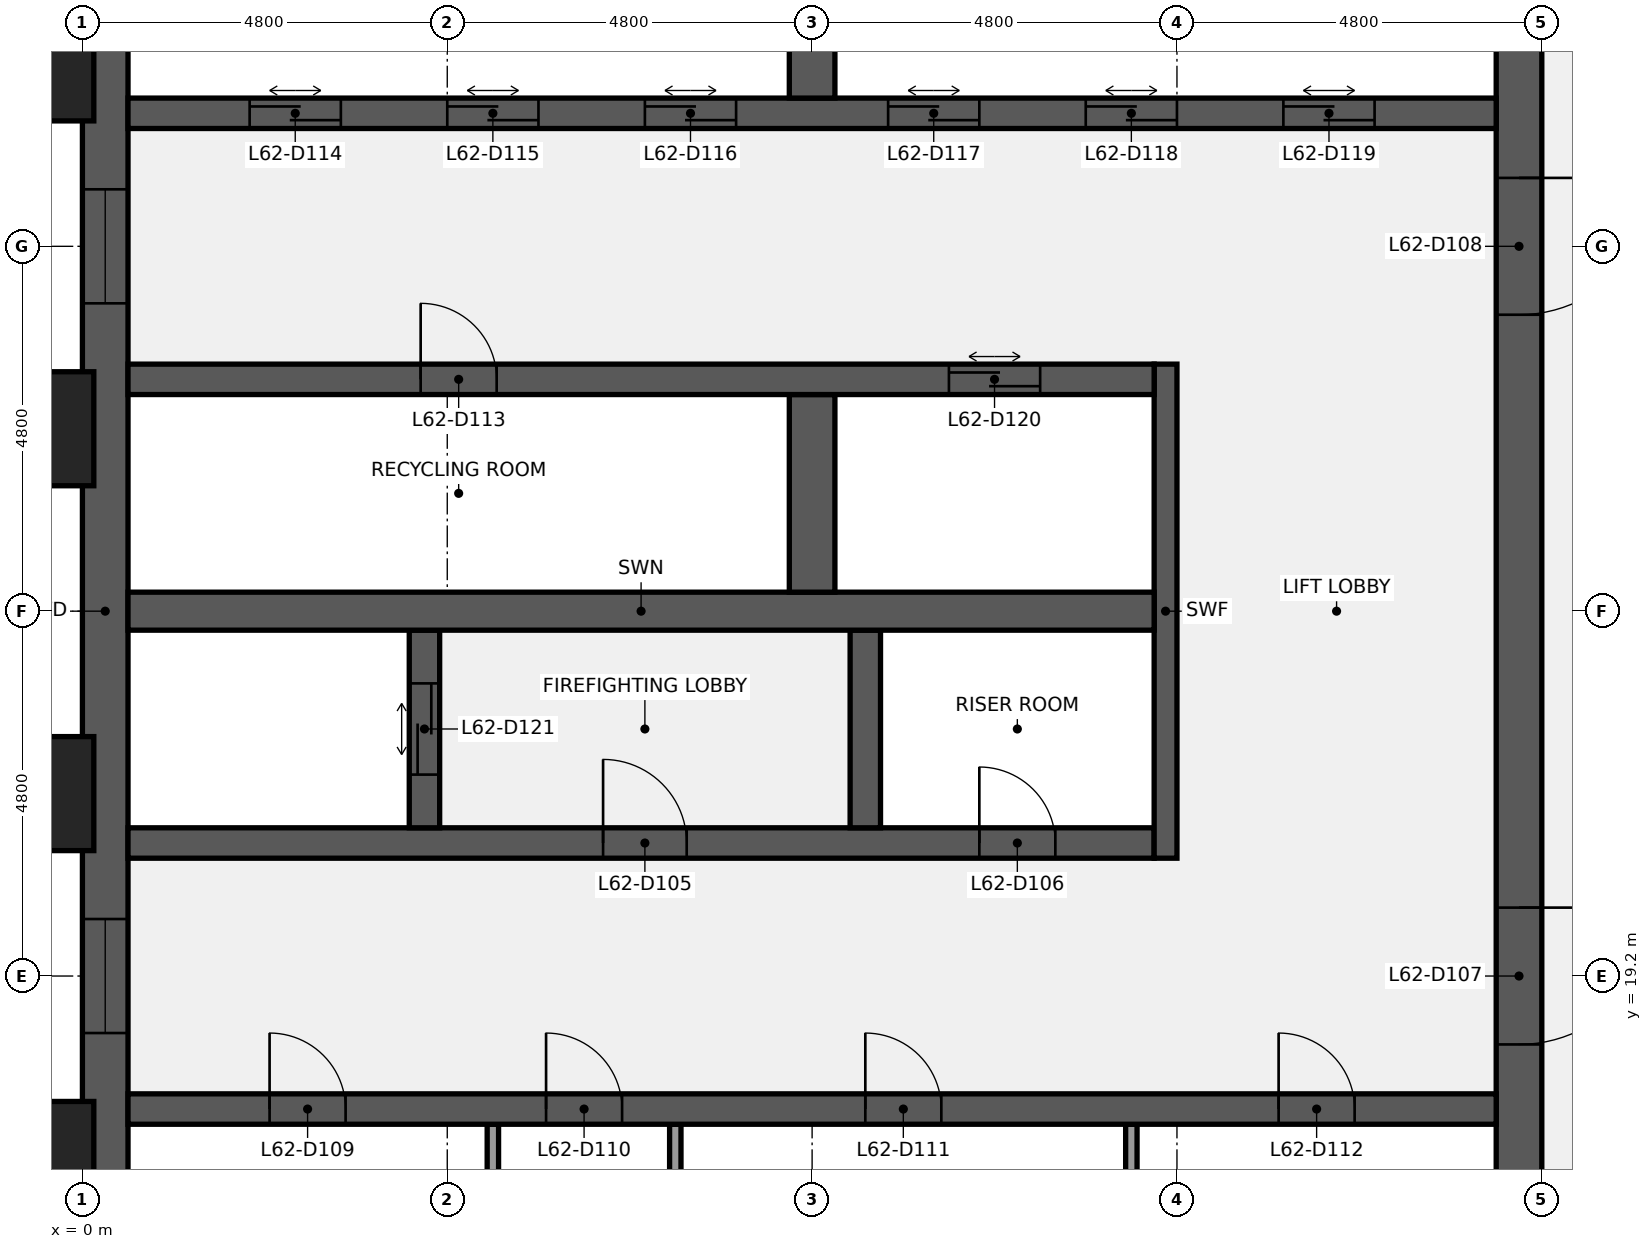
"""IFC4 building model, lengths in metres.
Left out: names, types, materials, properties, quantities, classifications, styles, units other than length and angle.
Written with IfcOpenShell. Run it as: python <this file> out.ifc"""

import sys

from ifc_helpers import new_model, si_unit, direction, frame, frame_2d, origin, origin_2d, place, context, subcontext, project, spatial, rectangle, extrude, element, fill, save


model = new_model("IFC4")
c1 = context("Model", 3, precision=1e-05, world=origin(), true_north=direction((0.0, 1.0)))
c2 = subcontext(c1, "Body", "Model", "MODEL_VIEW")
j1 = project(units=[si_unit("LENGTHUNIT", "METRE"), si_unit("PLANEANGLEUNIT", "RADIAN")], contexts=[c1])
p1 = place(None, origin())
s1 = spatial("IfcSite", under=j1, at=p1, CompositionType="ELEMENT")
p2 = place(p1, origin())
s2 = spatial("IfcBuilding", under=s1, at=p2, CompositionType="ELEMENT")
p3 = place(p2, frame((0.0, 0.0, 286.3)))
s3 = spatial("IfcBuildingStorey", under=s2, at=p3, CompositionType="ELEMENT", Elevation=286.3)
p4 = place(p3, frame((0.3, 9.6, 0.0), z_axis=(0.0, 0.0, 1.0), x_axis=(0.0, 1.0, 0.0)))
e1 = element("IfcWall", 1, at=p4, inside=s3, PredefinedType="SHEAR", context=c2, shape_type="SweptSolid", body=[
    extrude(rectangle(XDim=28.8, YDim=0.6, at=frame_2d((14.4, 0.0))), origin(), (0.0, 0.0, 1.0), 3.84),
])
p5 = place(p4, frame((8.85, 0.0, 0.9)))
e2 = element("IfcOpeningElement", 2, at=p5, cuts=e1, PredefinedType="OPENING", context=c2, shape_type="SweptSolid", body=[
    extrude(rectangle(XDim=1.5, YDim=1.5, at=frame_2d((0.75, 0.75))), frame((0.0, 0.31, 0.0), z_axis=(0.0, -1.0, 0.0), x_axis=(1.0, 0.0, 0.0)), (0.0, 0.0, 1.0), 0.62),
])
p6 = place(p4, frame((18.45, 0.0, 0.9)))
e3 = element("IfcOpeningElement", 3, at=p6, cuts=e1, PredefinedType="OPENING", context=c2, shape_type="SweptSolid", body=[
    extrude(rectangle(XDim=1.5, YDim=1.5, at=frame_2d((0.75, 0.75))), frame((0.0, 0.31, 0.0), z_axis=(0.0, -1.0, 0.0), x_axis=(1.0, 0.0, 0.0)), (0.0, 0.0, 1.0), 0.62),
])
p7 = place(p3, frame((18.9, 38.4, 0.0), z_axis=(0.0, 0.0, 1.0), x_axis=(0.0, -1.0, 0.0)))
e4 = element("IfcWall", 4, at=p7, inside=s3, PredefinedType="SHEAR", context=c2, shape_type="SweptSolid", body=[
    extrude(rectangle(XDim=28.8, YDim=0.6, at=frame_2d((14.4, 0.0))), origin(), (0.0, 0.0, 1.0), 3.84),
])
p8 = place(p7, frame((18.3, 0.0, 0.0)))
e5 = element("IfcOpeningElement", 5, at=p8, cuts=e4, PredefinedType="OPENING", context=c2, shape_type="SweptSolid", body=[
    extrude(rectangle(XDim=1.8, YDim=2.1, at=frame_2d((0.9, 1.05))), frame((0.0, 0.31, 0.0), z_axis=(0.0, -1.0, 0.0), x_axis=(1.0, 0.0, 0.0)), (0.0, 0.0, 1.0), 0.62),
])
p9 = place(p7, frame((8.7, 0.0, 0.0)))
e6 = element("IfcOpeningElement", 6, at=p9, cuts=e4, PredefinedType="OPENING", context=c2, shape_type="SweptSolid", body=[
    extrude(rectangle(XDim=1.8, YDim=2.1, at=frame_2d((0.9, 1.05))), frame((0.0, 0.31, 0.0), z_axis=(0.0, -1.0, 0.0), x_axis=(1.0, 0.0, 0.0)), (0.0, 0.0, 1.0), 0.62),
])
for number, where, z_axis, x_axis in (
    (7, (5.4, 14.65, 0.0), (0.0, 0.0, 1.0), (0.0, 1.0, 0.0)),
    (8, (7.8, 14.65, 0.0), (0.0, 0.0, 1.0), (0.0, 1.0, 0.0)),
    (9, (13.8, 14.65, 0.0), (0.0, 0.0, 1.0), (0.0, 1.0, 0.0)),
):
    element("IfcWall", number, at=place(p3, frame(where, z_axis=z_axis, x_axis=x_axis)), inside=s3, PredefinedType="PARTITIONING", context=c2, shape_type="SweptSolid", body=[
        extrude(rectangle(XDim=2.6, YDim=0.15, at=frame_2d((1.3, 0.0))), origin(), (0.0, 0.0, 1.0), 3.84),
    ])
p10 = place(p3, frame((0.6, 17.45, 0.0), z_axis=(0.0, 0.0, 1.0), x_axis=(1.0, 0.0, 0.0)))
e10 = element("IfcWall", 10, at=p10, inside=s3, PredefinedType="SHEAR", context=c2, shape_type="SweptSolid", body=[
    extrude(rectangle(XDim=18.0, YDim=0.4, at=frame_2d((9.0, 0.0))), origin(), (0.0, 0.0, 1.0), 3.84),
])
p11 = place(p10, frame((1.863, 0.0, 0.0)))
e11 = element("IfcOpeningElement", 11, at=p11, cuts=e10, PredefinedType="OPENING", context=c2, shape_type="SweptSolid", body=[
    extrude(rectangle(XDim=1.0, YDim=2.1, at=frame_2d((0.5, 1.05))), frame((0.0, 0.21, 0.0), z_axis=(0.0, -1.0, 0.0), x_axis=(1.0, 0.0, 0.0)), (0.0, 0.0, 1.0), 0.42),
])
p12 = place(p10, frame((5.5, 0.0, 0.0)))
e12 = element("IfcOpeningElement", 12, at=p12, cuts=e10, PredefinedType="OPENING", context=c2, shape_type="SweptSolid", body=[
    extrude(rectangle(XDim=1.0, YDim=2.1, at=frame_2d((0.5, 1.05))), frame((0.0, 0.21, 0.0), z_axis=(0.0, -1.0, 0.0), x_axis=(1.0, 0.0, 0.0)), (0.0, 0.0, 1.0), 0.42),
])
p13 = place(p10, frame((9.7, 0.0, 0.0)))
e13 = element("IfcOpeningElement", 13, at=p13, cuts=e10, PredefinedType="OPENING", context=c2, shape_type="SweptSolid", body=[
    extrude(rectangle(XDim=1.0, YDim=2.1, at=frame_2d((0.5, 1.05))), frame((0.0, 0.21, 0.0), z_axis=(0.0, -1.0, 0.0), x_axis=(1.0, 0.0, 0.0)), (0.0, 0.0, 1.0), 0.42),
])
p14 = place(p10, frame((15.137, 0.0, 0.0)))
e14 = element("IfcOpeningElement", 14, at=p14, cuts=e10, PredefinedType="OPENING", context=c2, shape_type="SweptSolid", body=[
    extrude(rectangle(XDim=1.0, YDim=2.1, at=frame_2d((0.5, 1.05))), frame((0.0, 0.21, 0.0), z_axis=(0.0, -1.0, 0.0), x_axis=(1.0, 0.0, 0.0)), (0.0, 0.0, 1.0), 0.42),
])
p15 = place(p3, frame((0.6, 20.95, 0.0), z_axis=(0.0, 0.0, 1.0), x_axis=(1.0, 0.0, 0.0)))
e15 = element("IfcWall", 15, at=p15, inside=s3, PredefinedType="SHEAR", context=c2, shape_type="SweptSolid", body=[
    extrude(rectangle(XDim=13.5, YDim=0.4, at=frame_2d((6.75, 0.0))), origin(), (0.0, 0.0, 1.0), 3.84),
])
p16 = place(p15, frame((6.25, 0.0, 0.0)))
e16 = element("IfcOpeningElement", 16, at=p16, cuts=e15, PredefinedType="OPENING", context=c2, shape_type="SweptSolid", body=[
    extrude(rectangle(XDim=1.1, YDim=2.1, at=frame_2d((0.55, 1.05))), frame((0.0, 0.21, 0.0), z_axis=(0.0, -1.0, 0.0), x_axis=(1.0, 0.0, 0.0)), (0.0, 0.0, 1.0), 0.42),
])
p17 = place(p15, frame((11.2, 0.0, 0.0)))
e17 = element("IfcOpeningElement", 17, at=p17, cuts=e15, PredefinedType="OPENING", context=c2, shape_type="SweptSolid", body=[
    extrude(rectangle(XDim=1.0, YDim=2.1, at=frame_2d((0.5, 1.05))), frame((0.0, 0.21, 0.0), z_axis=(0.0, -1.0, 0.0), x_axis=(1.0, 0.0, 0.0)), (0.0, 0.0, 1.0), 0.42),
])
p18 = place(p3, frame((14.25, 20.75, 0.0), z_axis=(0.0, 0.0, 1.0), x_axis=(0.0, 1.0, 0.0)))
e18 = element("IfcWall", 18, at=p18, inside=s3, PredefinedType="SHEAR", context=c2, shape_type="SweptSolid", body=[
    extrude(rectangle(XDim=6.5, YDim=0.3, at=frame_2d((3.25, 0.0))), origin(), (0.0, 0.0, 1.0), 3.84),
])
p19 = place(p3, frame((4.5, 21.15, 0.0), z_axis=(0.0, 0.0, 1.0), x_axis=(0.0, 1.0, 0.0)))
e19 = element("IfcWall", 19, at=p19, inside=s3, PredefinedType="SHEAR", context=c2, shape_type="SweptSolid", body=[
    extrude(rectangle(XDim=2.6, YDim=0.4, at=frame_2d((1.3, 0.0))), origin(), (0.0, 0.0, 1.0), 3.84),
])
p20 = place(p19, frame((0.7, 0.0, 0.0)))
e20 = element("IfcOpeningElement", 20, at=p20, cuts=e19, PredefinedType="OPENING", context=c2, shape_type="SweptSolid", body=[
    extrude(rectangle(XDim=1.2, YDim=2.1, at=frame_2d((0.6, 1.05))), frame((0.0, 0.21, 0.0), z_axis=(0.0, -1.0, 0.0), x_axis=(1.0, 0.0, 0.0)), (0.0, 0.0, 1.0), 0.42),
])
p21 = place(p3, frame((10.3, 21.15, 0.0), z_axis=(0.0, 0.0, 1.0), x_axis=(0.0, 1.0, 0.0)))
e21 = element("IfcWall", 21, at=p21, inside=s3, PredefinedType="SHEAR", context=c2, shape_type="SweptSolid", body=[
    extrude(rectangle(XDim=2.6, YDim=0.4, at=frame_2d((1.3, 0.0))), origin(), (0.0, 0.0, 1.0), 3.84),
])
p22 = place(p3, frame((0.6, 24.0, 0.0), z_axis=(0.0, 0.0, 1.0), x_axis=(1.0, 0.0, 0.0)))
e22 = element("IfcWall", 22, at=p22, inside=s3, PredefinedType="SHEAR", context=c2, shape_type="SweptSolid", body=[
    extrude(rectangle(XDim=13.5, YDim=0.5, at=frame_2d((6.75, 0.0))), origin(), (0.0, 0.0, 1.0), 3.84),
])
p23 = place(p3, frame((9.6, 24.25, 0.0), z_axis=(0.0, 0.0, 1.0), x_axis=(0.0, 1.0, 0.0)))
e23 = element("IfcWall", 23, at=p23, inside=s3, PredefinedType="SHEAR", context=c2, shape_type="SweptSolid", body=[
    extrude(rectangle(XDim=2.6, YDim=0.6, at=frame_2d((1.3, 0.0))), origin(), (0.0, 0.0, 1.0), 3.84),
])
p24 = place(p3, frame((0.6, 27.05, 0.0), z_axis=(0.0, 0.0, 1.0), x_axis=(1.0, 0.0, 0.0)))
e24 = element("IfcWall", 24, at=p24, inside=s3, PredefinedType="SHEAR", context=c2, shape_type="SweptSolid", body=[
    extrude(rectangle(XDim=13.5, YDim=0.4, at=frame_2d((6.75, 0.0))), origin(), (0.0, 0.0, 1.0), 3.84),
])
p25 = place(p24, frame((3.85, 0.0, 0.0)))
e25 = element("IfcOpeningElement", 25, at=p25, cuts=e24, PredefinedType="OPENING", context=c2, shape_type="SweptSolid", body=[
    extrude(rectangle(XDim=1.0, YDim=2.1, at=frame_2d((0.5, 1.05))), frame((0.0, 0.21, 0.0), z_axis=(0.0, -1.0, 0.0), x_axis=(1.0, 0.0, 0.0)), (0.0, 0.0, 1.0), 0.42),
])
p26 = place(p24, frame((10.8, 0.0, 0.0)))
e26 = element("IfcOpeningElement", 26, at=p26, cuts=e24, PredefinedType="OPENING", context=c2, shape_type="SweptSolid", body=[
    extrude(rectangle(XDim=1.2, YDim=2.1, at=frame_2d((0.6, 1.05))), frame((0.0, 0.21, 0.0), z_axis=(0.0, -1.0, 0.0), x_axis=(1.0, 0.0, 0.0)), (0.0, 0.0, 1.0), 0.42),
])
p27 = place(p3, frame((0.6, 30.55, 0.0), z_axis=(0.0, 0.0, 1.0), x_axis=(1.0, 0.0, 0.0)))
e27 = element("IfcWall", 27, at=p27, inside=s3, PredefinedType="SHEAR", context=c2, shape_type="SweptSolid", body=[
    extrude(rectangle(XDim=18.0, YDim=0.4, at=frame_2d((9.0, 0.0))), origin(), (0.0, 0.0, 1.0), 3.84),
])
p28 = place(p27, frame((1.6, 0.0, 0.0)))
e28 = element("IfcOpeningElement", 28, at=p28, cuts=e27, PredefinedType="OPENING", context=c2, shape_type="SweptSolid", body=[
    extrude(rectangle(XDim=1.2, YDim=2.1, at=frame_2d((0.6, 1.05))), frame((0.0, 0.21, 0.0), z_axis=(0.0, -1.0, 0.0), x_axis=(1.0, 0.0, 0.0)), (0.0, 0.0, 1.0), 0.42),
])
p29 = place(p27, frame((4.2, 0.0, 0.0)))
e29 = element("IfcOpeningElement", 29, at=p29, cuts=e27, PredefinedType="OPENING", context=c2, shape_type="SweptSolid", body=[
    extrude(rectangle(XDim=1.2, YDim=2.1, at=frame_2d((0.6, 1.05))), frame((0.0, 0.21, 0.0), z_axis=(0.0, -1.0, 0.0), x_axis=(1.0, 0.0, 0.0)), (0.0, 0.0, 1.0), 0.42),
])
p30 = place(p27, frame((6.8, 0.0, 0.0)))
e30 = element("IfcOpeningElement", 30, at=p30, cuts=e27, PredefinedType="OPENING", context=c2, shape_type="SweptSolid", body=[
    extrude(rectangle(XDim=1.2, YDim=2.1, at=frame_2d((0.6, 1.05))), frame((0.0, 0.21, 0.0), z_axis=(0.0, -1.0, 0.0), x_axis=(1.0, 0.0, 0.0)), (0.0, 0.0, 1.0), 0.42),
])
p31 = place(p27, frame((10.0, 0.0, 0.0)))
e31 = element("IfcOpeningElement", 31, at=p31, cuts=e27, PredefinedType="OPENING", context=c2, shape_type="SweptSolid", body=[
    extrude(rectangle(XDim=1.2, YDim=2.1, at=frame_2d((0.6, 1.05))), frame((0.0, 0.21, 0.0), z_axis=(0.0, -1.0, 0.0), x_axis=(1.0, 0.0, 0.0)), (0.0, 0.0, 1.0), 0.42),
])
p32 = place(p27, frame((12.6, 0.0, 0.0)))
e32 = element("IfcOpeningElement", 32, at=p32, cuts=e27, PredefinedType="OPENING", context=c2, shape_type="SweptSolid", body=[
    extrude(rectangle(XDim=1.2, YDim=2.1, at=frame_2d((0.6, 1.05))), frame((0.0, 0.21, 0.0), z_axis=(0.0, -1.0, 0.0), x_axis=(1.0, 0.0, 0.0)), (0.0, 0.0, 1.0), 0.42),
])
p33 = place(p27, frame((15.2, 0.0, 0.0)))
e33 = element("IfcOpeningElement", 33, at=p33, cuts=e27, PredefinedType="OPENING", context=c2, shape_type="SweptSolid", body=[
    extrude(rectangle(XDim=1.2, YDim=2.1, at=frame_2d((0.6, 1.05))), frame((0.0, 0.21, 0.0), z_axis=(0.0, -1.0, 0.0), x_axis=(1.0, 0.0, 0.0)), (0.0, 0.0, 1.0), 0.42),
])
p34 = place(p3, frame((9.6, 30.75, 0.0), z_axis=(0.0, 0.0, 1.0), x_axis=(0.0, 1.0, 0.0)))
e34 = element("IfcWall", 34, at=p34, inside=s3, PredefinedType="SHEAR", context=c2, shape_type="SweptSolid", body=[
    extrude(rectangle(XDim=2.6, YDim=0.6, at=frame_2d((1.3, 0.0))), origin(), (0.0, 0.0, 1.0), 3.84),
])
for number, where, z_axis, x_axis in (
    (35, (-0.75, 16.8, 0.0), (0.0, 0.0, 1.0), (0.0, 1.0, 0.0)),
    (36, (-0.75, 21.6, 0.0), (0.0, 0.0, 1.0), (0.0, 1.0, 0.0)),
    (37, (-0.75, 26.4, 0.0), (0.0, 0.0, 1.0), (0.0, 1.0, 0.0)),
    (38, (-0.75, 31.2, 0.0), (0.0, 0.0, 1.0), (0.0, 1.0, 0.0)),
):
    element("IfcColumn", number, at=place(p3, frame(where, z_axis=z_axis, x_axis=x_axis)), inside=s3, PredefinedType="PILASTER", context=c2, shape_type="SweptSolid", body=[
        extrude(rectangle(XDim=1.8, YDim=1.5, at=origin_2d()), origin(), (0.0, 0.0, 1.0), 4.0),
    ])
p35 = place(p16, origin())
e39 = element("IfcDoor", 39, at=p35, inside=s3, OperationType="SINGLE_SWING_LEFT", PredefinedType="DOOR", context=c2, shape_type="SweptSolid", body=[
    extrude(rectangle(XDim=1.1, YDim=2.1, at=frame_2d((0.55, 1.05))), frame((0.0, 0.025, 0.0), z_axis=(0.0, -1.0, 0.0), x_axis=(1.0, 0.0, 0.0)), (0.0, 0.0, 1.0), 0.05),
])
fill(e16, e39)
p36 = place(p17, origin())
e40 = element("IfcDoor", 40, at=p36, inside=s3, OperationType="SINGLE_SWING_LEFT", PredefinedType="DOOR", context=c2, shape_type="SweptSolid", body=[
    extrude(rectangle(XDim=1.0, YDim=2.1, at=frame_2d((0.5, 1.05))), frame((0.0, 0.025, 0.0), z_axis=(0.0, -1.0, 0.0), x_axis=(1.0, 0.0, 0.0)), (0.0, 0.0, 1.0), 0.05),
])
fill(e17, e40)
p37 = place(p8, origin())
e41 = element("IfcDoor", 41, at=p37, inside=s3, OperationType="DOUBLE_DOOR_SINGLE_SWING", PredefinedType="DOOR", context=c2, shape_type="SweptSolid", body=[
    extrude(rectangle(XDim=1.8, YDim=2.1, at=frame_2d((0.9, 1.05))), frame((0.0, 0.025, 0.0), z_axis=(0.0, -1.0, 0.0), x_axis=(1.0, 0.0, 0.0)), (0.0, 0.0, 1.0), 0.05),
])
fill(e5, e41)
p38 = place(p9, origin())
e42 = element("IfcDoor", 42, at=p38, inside=s3, OperationType="DOUBLE_DOOR_SINGLE_SWING", PredefinedType="DOOR", context=c2, shape_type="SweptSolid", body=[
    extrude(rectangle(XDim=1.8, YDim=2.1, at=frame_2d((0.9, 1.05))), frame((0.0, 0.025, 0.0), z_axis=(0.0, -1.0, 0.0), x_axis=(1.0, 0.0, 0.0)), (0.0, 0.0, 1.0), 0.05),
])
fill(e6, e42)
p39 = place(p11, origin())
e43 = element("IfcDoor", 43, at=p39, inside=s3, OperationType="SINGLE_SWING_LEFT", PredefinedType="DOOR", context=c2, shape_type="SweptSolid", body=[
    extrude(rectangle(XDim=1.0, YDim=2.1, at=frame_2d((0.5, 1.05))), frame((0.0, 0.025, 0.0), z_axis=(0.0, -1.0, 0.0), x_axis=(1.0, 0.0, 0.0)), (0.0, 0.0, 1.0), 0.05),
])
fill(e11, e43)
p40 = place(p12, origin())
e44 = element("IfcDoor", 44, at=p40, inside=s3, OperationType="SINGLE_SWING_LEFT", PredefinedType="DOOR", context=c2, shape_type="SweptSolid", body=[
    extrude(rectangle(XDim=1.0, YDim=2.1, at=frame_2d((0.5, 1.05))), frame((0.0, 0.025, 0.0), z_axis=(0.0, -1.0, 0.0), x_axis=(1.0, 0.0, 0.0)), (0.0, 0.0, 1.0), 0.05),
])
fill(e12, e44)
p41 = place(p13, origin())
e45 = element("IfcDoor", 45, at=p41, inside=s3, OperationType="SINGLE_SWING_LEFT", PredefinedType="DOOR", context=c2, shape_type="SweptSolid", body=[
    extrude(rectangle(XDim=1.0, YDim=2.1, at=frame_2d((0.5, 1.05))), frame((0.0, 0.025, 0.0), z_axis=(0.0, -1.0, 0.0), x_axis=(1.0, 0.0, 0.0)), (0.0, 0.0, 1.0), 0.05),
])
fill(e13, e45)
p42 = place(p14, origin())
e46 = element("IfcDoor", 46, at=p42, inside=s3, OperationType="SINGLE_SWING_LEFT", PredefinedType="DOOR", context=c2, shape_type="SweptSolid", body=[
    extrude(rectangle(XDim=1.0, YDim=2.1, at=frame_2d((0.5, 1.05))), frame((0.0, 0.025, 0.0), z_axis=(0.0, -1.0, 0.0), x_axis=(1.0, 0.0, 0.0)), (0.0, 0.0, 1.0), 0.05),
])
fill(e14, e46)
p43 = place(p25, origin())
e47 = element("IfcDoor", 47, at=p43, inside=s3, OperationType="SINGLE_SWING_LEFT", PredefinedType="DOOR", context=c2, shape_type="SweptSolid", body=[
    extrude(rectangle(XDim=1.0, YDim=2.1, at=frame_2d((0.5, 1.05))), frame((0.0, 0.025, 0.0), z_axis=(0.0, -1.0, 0.0), x_axis=(1.0, 0.0, 0.0)), (0.0, 0.0, 1.0), 0.05),
])
fill(e25, e47)
p44 = place(p28, origin())
e48 = element("IfcDoor", 48, at=p44, inside=s3, OperationType="DOUBLE_DOOR_SLIDING", PredefinedType="DOOR", context=c2, shape_type="SweptSolid", body=[
    extrude(rectangle(XDim=1.2, YDim=2.1, at=frame_2d((0.6, 1.05))), frame((0.0, 0.025, 0.0), z_axis=(0.0, -1.0, 0.0), x_axis=(1.0, 0.0, 0.0)), (0.0, 0.0, 1.0), 0.05),
])
fill(e28, e48)
p45 = place(p29, origin())
e49 = element("IfcDoor", 49, at=p45, inside=s3, OperationType="DOUBLE_DOOR_SLIDING", PredefinedType="DOOR", context=c2, shape_type="SweptSolid", body=[
    extrude(rectangle(XDim=1.2, YDim=2.1, at=frame_2d((0.6, 1.05))), frame((0.0, 0.025, 0.0), z_axis=(0.0, -1.0, 0.0), x_axis=(1.0, 0.0, 0.0)), (0.0, 0.0, 1.0), 0.05),
])
fill(e29, e49)
p46 = place(p30, origin())
e50 = element("IfcDoor", 50, at=p46, inside=s3, OperationType="DOUBLE_DOOR_SLIDING", PredefinedType="DOOR", context=c2, shape_type="SweptSolid", body=[
    extrude(rectangle(XDim=1.2, YDim=2.1, at=frame_2d((0.6, 1.05))), frame((0.0, 0.025, 0.0), z_axis=(0.0, -1.0, 0.0), x_axis=(1.0, 0.0, 0.0)), (0.0, 0.0, 1.0), 0.05),
])
fill(e30, e50)
p47 = place(p31, origin())
e51 = element("IfcDoor", 51, at=p47, inside=s3, OperationType="DOUBLE_DOOR_SLIDING", PredefinedType="DOOR", context=c2, shape_type="SweptSolid", body=[
    extrude(rectangle(XDim=1.2, YDim=2.1, at=frame_2d((0.6, 1.05))), frame((0.0, 0.025, 0.0), z_axis=(0.0, -1.0, 0.0), x_axis=(1.0, 0.0, 0.0)), (0.0, 0.0, 1.0), 0.05),
])
fill(e31, e51)
p48 = place(p32, origin())
e52 = element("IfcDoor", 52, at=p48, inside=s3, OperationType="DOUBLE_DOOR_SLIDING", PredefinedType="DOOR", context=c2, shape_type="SweptSolid", body=[
    extrude(rectangle(XDim=1.2, YDim=2.1, at=frame_2d((0.6, 1.05))), frame((0.0, 0.025, 0.0), z_axis=(0.0, -1.0, 0.0), x_axis=(1.0, 0.0, 0.0)), (0.0, 0.0, 1.0), 0.05),
])
fill(e32, e52)
p49 = place(p33, origin())
e53 = element("IfcDoor", 53, at=p49, inside=s3, OperationType="DOUBLE_DOOR_SLIDING", PredefinedType="DOOR", context=c2, shape_type="SweptSolid", body=[
    extrude(rectangle(XDim=1.2, YDim=2.1, at=frame_2d((0.6, 1.05))), frame((0.0, 0.025, 0.0), z_axis=(0.0, -1.0, 0.0), x_axis=(1.0, 0.0, 0.0)), (0.0, 0.0, 1.0), 0.05),
])
fill(e33, e53)
p50 = place(p26, origin())
e54 = element("IfcDoor", 54, at=p50, inside=s3, OperationType="DOUBLE_DOOR_SLIDING", PredefinedType="DOOR", context=c2, shape_type="SweptSolid", body=[
    extrude(rectangle(XDim=1.2, YDim=2.1, at=frame_2d((0.6, 1.05))), frame((0.0, 0.025, 0.0), z_axis=(0.0, -1.0, 0.0), x_axis=(1.0, 0.0, 0.0)), (0.0, 0.0, 1.0), 0.05),
])
fill(e26, e54)
p51 = place(p20, origin())
e55 = element("IfcDoor", 55, at=p51, inside=s3, OperationType="DOUBLE_DOOR_SLIDING", PredefinedType="DOOR", context=c2, shape_type="SweptSolid", body=[
    extrude(rectangle(XDim=1.2, YDim=2.1, at=frame_2d((0.6, 1.05))), frame((0.0, 0.025, 0.0), z_axis=(0.0, -1.0, 0.0), x_axis=(1.0, 0.0, 0.0)), (0.0, 0.0, 1.0), 0.05),
])
fill(e20, e55)
p52 = place(p5, origin())
e56 = element("IfcWindow", 56, at=p52, inside=s3, PartitioningType="SINGLE_PANEL", PredefinedType="WINDOW", context=c2, shape_type="SweptSolid", body=[
    extrude(rectangle(XDim=1.5, YDim=1.5, at=frame_2d((0.75, 0.75))), frame((0.0, 0.03, 0.0), z_axis=(0.0, -1.0, 0.0), x_axis=(1.0, 0.0, 0.0)), (0.0, 0.0, 1.0), 0.06),
])
fill(e2, e56)
p53 = place(p6, origin())
e57 = element("IfcWindow", 57, at=p53, inside=s3, PartitioningType="SINGLE_PANEL", PredefinedType="WINDOW", context=c2, shape_type="SweptSolid", body=[
    extrude(rectangle(XDim=1.5, YDim=1.5, at=frame_2d((0.75, 0.75))), frame((0.0, 0.03, 0.0), z_axis=(0.0, -1.0, 0.0), x_axis=(1.0, 0.0, 0.0)), (0.0, 0.0, 1.0), 0.06),
])
fill(e3, e57)
save(model, sys.argv[1])
